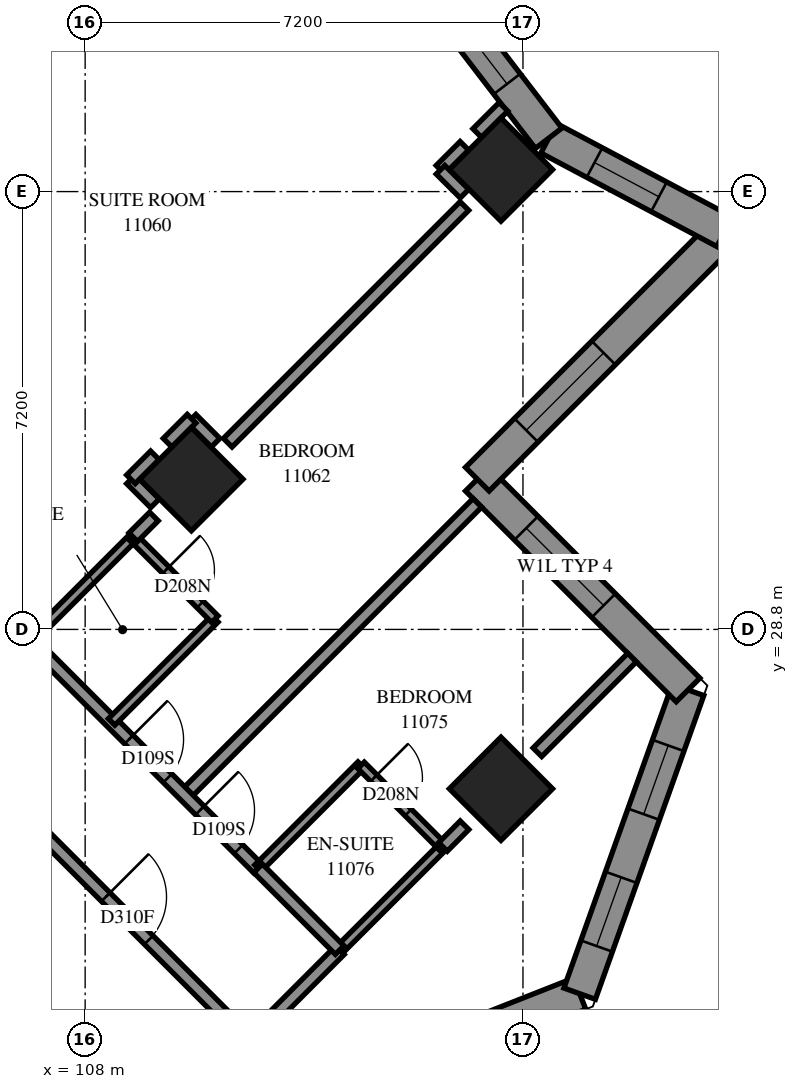
"""IFC4 building model, lengths in metres.
Left out: names, types, materials, properties, quantities, classifications, styles, units other than length and angle.
Written with IfcOpenShell. Run it as: python <this file> out.ifc"""

import sys

from ifc_helpers import new_model, si_unit, direction, frame, frame_2d, origin, origin_2d, place, context, subcontext, project, spatial, polyline, rectangle, outline, extrude, element, fill, save


model = new_model("IFC4")
c1 = context("Model", 3, precision=1e-05, world=origin(), true_north=direction((0.0, 1.0)))
c2 = subcontext(c1, "Body", "Model", "MODEL_VIEW")
j1 = project(units=[si_unit("LENGTHUNIT", "METRE"), si_unit("PLANEANGLEUNIT", "RADIAN")], contexts=[c1])
p1 = place(None, origin())
s1 = spatial("IfcSite", under=j1, at=p1, CompositionType="ELEMENT")
p2 = place(p1, origin())
s2 = spatial("IfcBuilding", under=s1, at=p2, CompositionType="ELEMENT")
p3 = place(p2, frame((0.0, 0.0, 44.0)))
s3 = spatial("IfcBuildingStorey", under=s2, at=p3, CompositionType="ELEMENT", Elevation=44.0)
for number, where, z_axis, x_axis in (
    (1, (114.838, 36.362, 0.0), (0.0, 0.0, 1.0), (0.707, -0.707, 0.0)),
    (2, (109.747, 31.271, 0.0), (0.0, 0.0, 1.0), (0.707, -0.707, 0.0)),
    (3, (114.838, 26.18, 0.0), (0.0, 0.0, 1.0), (0.707, -0.707, 0.0)),
):
    element("IfcColumn", number, at=place(p3, frame(where, z_axis=z_axis, x_axis=x_axis)), inside=s3, PredefinedType="COLUMN", context=c2, shape_type="SweptSolid", body=[
        extrude(rectangle(XDim=1.2, YDim=1.2, at=origin_2d()), origin(), (0.0, 0.0, 1.0), 3.1),
    ])
p4 = place(p3, frame((111.002, 20.787, 0.0), z_axis=(0.0, 0.0, 1.0), x_axis=(0.930334543, 0.3667119279, 0.0)))
e4 = element("IfcWall", 4, at=p4, inside=s3, PredefinedType="SOLIDWALL", context=c2, shape_type="SweptSolid", body=[
    extrude(outline(polyline([(0.119, -0.275), (5.64, -0.275), (5.39, 0.275), (-0.119, 0.275), (0.119, -0.275)])), origin(), (0.0, 0.0, 1.0), 3.1),
])
p5 = place(p4, frame((1.178, 0.0, 0.5)))
e5 = element("IfcOpeningElement", 5, at=p5, cuts=e4, PredefinedType="OPENING", context=c2, shape_type="SweptSolid", body=[
    extrude(rectangle(XDim=2.8, YDim=2.45, at=frame_2d((1.4, 1.225))), frame((0.0, 0.285, 0.0), z_axis=(0.0, -1.0, 0.0), x_axis=(1.0, 0.0, 0.0)), (0.0, 0.0, 1.0), 0.57),
])
p6 = place(p3, frame((116.132, 22.81, 0.0), z_axis=(0.0, 0.0, 1.0), x_axis=(0.3360509292, 0.9418438156, 0.0)))
e6 = element("IfcWall", 6, at=p6, inside=s3, PredefinedType="SOLIDWALL", context=c2, shape_type="SweptSolid", body=[
    extrude(outline(polyline([(-0.125, -0.275), (5.478, -0.275), (5.13, 0.275), (0.125, 0.275), (-0.125, -0.275)])), origin(), (0.0, 0.0, 1.0), 3.1),
])
p7 = place(p6, frame((0.832, 0.0, 0.5)))
e7 = element("IfcOpeningElement", 7, at=p7, cuts=e6, PredefinedType="OPENING", context=c2, shape_type="SweptSolid", body=[
    extrude(rectangle(XDim=1.2, YDim=2.45, at=frame_2d((0.6, 1.225))), frame((0.0, 0.285, 0.0), z_axis=(0.0, -1.0, 0.0), x_axis=(1.0, 0.0, 0.0)), (0.0, 0.0, 1.0), 0.57),
])
p8 = place(p6, frame((3.134, 0.0, 0.5)))
e8 = element("IfcOpeningElement", 8, at=p8, cuts=e6, PredefinedType="OPENING", context=c2, shape_type="SweptSolid", body=[
    extrude(rectangle(XDim=1.2, YDim=2.45, at=frame_2d((0.6, 1.225))), frame((0.0, 0.285, 0.0), z_axis=(0.0, -1.0, 0.0), x_axis=(1.0, 0.0, 0.0)), (0.0, 0.0, 1.0), 0.57),
])
p9 = place(p3, frame((117.915, 27.805, 0.0), z_axis=(0.0, 0.0, 1.0), x_axis=(-0.7071067812, 0.7071067812, 0.0)))
e9 = element("IfcWall", 9, at=p9, inside=s3, PredefinedType="SOLIDWALL", context=c2, shape_type="SweptSolid", body=[
    extrude(outline(polyline([(-0.174, -0.275), (4.626, -0.275), (5.176, 0.275), (0.174, 0.275), (-0.174, -0.275)])), origin(), (0.0, 0.0, 1.0), 3.1),
])
p10 = place(p9, frame((1.964, 0.0, 0.6)))
e10 = element("IfcOpeningElement", 10, at=p10, cuts=e9, PredefinedType="OPENING", context=c2, shape_type="SweptSolid", body=[
    extrude(rectangle(XDim=1.8, YDim=1.9, at=frame_2d((0.9, 0.95))), frame((0.0, 0.285, 0.0), z_axis=(0.0, -1.0, 0.0), x_axis=(1.0, 0.0, 0.0)), (0.0, 0.0, 1.0), 0.57),
])
p11 = place(p3, frame((114.449, 31.271, 0.0), z_axis=(0.0, 0.0, 1.0), x_axis=(0.7070980919, 0.7071154704, 0.0)))
e11 = element("IfcWall", 11, at=p11, inside=s3, PredefinedType="SOLIDWALL", context=c2, shape_type="SweptSolid", body=[
    extrude(outline(polyline([(0.275, -0.275), (6.126, -0.275), (5.383, 0.275), (-0.275, 0.275), (0.275, -0.275)])), origin(), (0.0, 0.0, 1.0), 3.1),
])
p12 = place(p11, frame((1.137, 0.0, 0.6)))
e12 = element("IfcOpeningElement", 12, at=p12, cuts=e11, PredefinedType="OPENING", context=c2, shape_type="SweptSolid", body=[
    extrude(rectangle(XDim=1.8, YDim=1.9, at=frame_2d((0.9, 0.95))), frame((0.0, 0.285, 0.0), z_axis=(0.0, -1.0, 0.0), x_axis=(1.0, 0.0, 0.0)), (0.0, 0.0, 1.0), 0.57),
])
p13 = place(p3, frame((118.518, 35.34, 0.0), z_axis=(0.0, 0.0, 1.0), x_axis=(-0.8831066362, 0.4691723234, 0.0)))
e13 = element("IfcWall", 13, at=p13, inside=s3, PredefinedType="SOLIDWALL", context=c2, shape_type="SweptSolid", body=[
    extrude(outline(polyline([(-0.372, -0.275), (3.219, -0.275), (3.338, 0.275), (0.372, 0.275), (-0.372, -0.275)])), origin(), (0.0, 0.0, 1.0), 3.1),
])
p14 = place(p13, frame((1.225, 0.0, 0.5)))
e14 = element("IfcOpeningElement", 14, at=p14, cuts=e13, PredefinedType="OPENING", context=c2, shape_type="SweptSolid", body=[
    extrude(rectangle(XDim=1.2, YDim=2.45, at=frame_2d((0.6, 1.225))), frame((0.0, 0.285, 0.0), z_axis=(0.0, -1.0, 0.0), x_axis=(1.0, 0.0, 0.0)), (0.0, 0.0, 1.0), 0.57),
])
p15 = place(p3, frame((115.623, 36.878, 0.0), z_axis=(0.0, 0.0, 1.0), x_axis=(-0.6089799783, 0.7931855937, 0.0)))
e15 = element("IfcWall", 15, at=p15, inside=s3, PredefinedType="SOLIDWALL", context=c2, shape_type="SweptSolid", body=[
    extrude(outline(polyline([(0.06, -0.275), (3.522, -0.275), (3.45, 0.275), (-0.06, 0.275), (0.06, -0.275)])), origin(), (0.0, 0.0, 1.0), 3.1),
])
p16 = place(p15, frame((1.125, 0.0, 0.5)))
e16 = element("IfcOpeningElement", 16, at=p16, cuts=e15, PredefinedType="OPENING", context=c2, shape_type="SweptSolid", body=[
    extrude(rectangle(XDim=1.2, YDim=2.45, at=frame_2d((0.6, 1.225))), frame((0.0, 0.285, 0.0), z_axis=(0.0, -1.0, 0.0), x_axis=(1.0, 0.0, 0.0)), (0.0, 0.0, 1.0), 0.57),
])
p17 = place(p3, frame((99.459, 36.255, 0.0), z_axis=(0.0, 0.0, 1.0), x_axis=(0.7071903932, 0.7070231593, 0.0)))
e17 = element("IfcWall", 17, at=p17, inside=s3, PredefinedType="PARTITIONING", context=c2, shape_type="SweptSolid", body=[
    extrude(rectangle(XDim=11.959, YDim=0.2, at=frame_2d((5.98, 0.0))), origin(), (0.0, 0.0, 1.0), 3.1),
])
p18 = place(p3, frame((103.061, 29.677, 0.0), z_axis=(0.0, 0.0, 1.0), x_axis=(0.7071067812, -0.7071067812, 0.0)))
e18 = element("IfcWall", 18, at=p18, inside=s3, PredefinedType="PARTITIONING", context=c2, shape_type="SweptSolid", body=[
    extrude(rectangle(XDim=10.802, YDim=0.2, at=frame_2d((5.401, 0.0))), origin(), (0.0, 0.0, 1.0), 3.1),
])
p19 = place(p18, frame((2.012, 0.0, 0.0)))
e19 = element("IfcOpeningElement", 19, at=p19, cuts=e18, PredefinedType="OPENING", context=c2, shape_type="SweptSolid", body=[
    extrude(rectangle(XDim=0.9, YDim=2.1, at=frame_2d((0.45, 1.05))), frame((0.0, 0.11, 0.0), z_axis=(0.0, -1.0, 0.0), x_axis=(1.0, 0.0, 0.0)), (0.0, 0.0, 1.0), 0.22),
])
p20 = place(p18, frame((7.463, 0.0, 0.0)))
e20 = element("IfcOpeningElement", 20, at=p20, cuts=e18, PredefinedType="OPENING", context=c2, shape_type="SweptSolid", body=[
    extrude(rectangle(XDim=1.0, YDim=2.1, at=frame_2d((0.5, 1.05))), frame((0.0, 0.11, 0.0), z_axis=(0.0, -1.0, 0.0), x_axis=(1.0, 0.0, 0.0)), (0.0, 0.0, 1.0), 0.22),
])
p21 = place(p3, frame((109.64, 26.074, 0.0), z_axis=(0.0, 0.0, 1.0), x_axis=(0.7072538194, 0.7069597124, 0.0)))
e21 = element("IfcWall", 21, at=p21, inside=s3, PredefinedType="PARTITIONING", context=c2, shape_type="SweptSolid", body=[
    extrude(rectangle(XDim=6.8, YDim=0.2, at=frame_2d((3.4, 0.0))), origin(), (0.0, 0.0, 1.0), 3.1),
])
for number, where, z_axis, x_axis in (
    (22, (110.345, 31.871, 0.0), (0.0, 0.0, 1.0), (0.707, 0.707, 0.0)),
    (23, (105.255, 36.963, 0.0), (0.0, 0.0, 1.0), (0.707, 0.707, 0.0)),
):
    element("IfcWall", number, at=place(p3, frame(where, z_axis=z_axis, x_axis=x_axis)), inside=s3, PredefinedType="PARTITIONING", context=c2, shape_type="SweptSolid", body=[
        extrude(rectangle(XDim=5.504, YDim=0.2, at=frame_2d((2.752, 0.0))), origin(), (0.0, 0.0, 1.0), 3.1),
    ])
p22 = place(p3, frame((107.093, 28.615, 0.0), z_axis=(0.0, 0.0, 1.0), x_axis=(0.7072011313, -0.7070124185, 0.0)))
e24 = element("IfcWall", 24, at=p22, inside=s3, PredefinedType="PARTITIONING", context=c2, shape_type="SweptSolid", body=[
    extrude(rectangle(XDim=5.299, YDim=0.2, at=frame_2d((2.65, 0.0))), origin(), (0.0, 0.0, 1.0), 3.1),
])
p23 = place(p22, frame((2.299, 0.0, 0.0)))
e25 = element("IfcOpeningElement", 25, at=p23, cuts=e24, PredefinedType="OPENING", context=c2, shape_type="SweptSolid", body=[
    extrude(rectangle(XDim=0.9, YDim=2.1, at=frame_2d((0.45, 1.05))), frame((0.0, 0.11, 0.0), z_axis=(0.0, -1.0, 0.0), x_axis=(1.0, 0.0, 0.0)), (0.0, 0.0, 1.0), 0.22),
])
p24 = place(p22, frame((3.949, 0.0, 0.0)))
e26 = element("IfcOpeningElement", 26, at=p24, cuts=e24, PredefinedType="OPENING", context=c2, shape_type="SweptSolid", body=[
    extrude(rectangle(XDim=0.9, YDim=2.1, at=frame_2d((0.45, 1.05))), frame((0.0, 0.11, 0.0), z_axis=(0.0, -1.0, 0.0), x_axis=(1.0, 0.0, 0.0)), (0.0, 0.0, 1.0), 0.22),
])
p25 = place(p3, frame((108.435, 27.279, 0.0), z_axis=(0.0, 0.0, 1.0), x_axis=(0.7075233388, 0.706689978, 0.0)))
e27 = element("IfcWall", 27, at=p25, inside=s3, PredefinedType="PARTITIONING", context=c2, shape_type="SweptSolid", body=[
    extrude(rectangle(XDim=2.4, YDim=0.15, at=frame_2d((1.2, 0.0))), origin(), (0.0, 0.0, 1.0), 3.1),
])
p26 = place(p3, frame((112.183, 23.531, 0.0), z_axis=(0.0, 0.0, 1.0), x_axis=(0.7075233388, 0.706689978, 0.0)))
e28 = element("IfcWall", 28, at=p26, inside=s3, PredefinedType="PARTITIONING", context=c2, shape_type="SweptSolid", body=[
    extrude(rectangle(XDim=2.4, YDim=0.15, at=frame_2d((1.2, 0.0))), origin(), (0.0, 0.0, 1.0), 2.6),
])
for number, where, z_axis, x_axis in (
    (29, (107.095, 28.621, 0.0), (0.0, 0.0, 1.0), (0.707, 0.707, 0.0)),
    (30, (110.843, 24.873, 0.0), (0.0, 0.0, 1.0), (0.707, 0.707, 0.0)),
):
    element("IfcWall", number, at=place(p3, frame(where, z_axis=z_axis, x_axis=x_axis)), inside=s3, PredefinedType="PARTITIONING", context=c2, shape_type="SweptSolid", body=[
        extrude(rectangle(XDim=2.398, YDim=0.15, at=frame_2d((1.199, 0.0))), origin(), (0.0, 0.0, 1.0), 3.1),
    ])
p27 = place(p3, frame((115.438, 26.78, 0.0), z_axis=(0.0, 0.0, 1.0), x_axis=(0.7071067812, 0.7071067812, 0.0)))
e31 = element("IfcWall", 31, at=p27, inside=s3, PredefinedType="PARTITIONING", context=c2, shape_type="SweptSolid", body=[
    extrude(rectangle(XDim=2.201, YDim=0.2, at=frame_2d((1.101, 0.0))), origin(), (0.0, 0.0, 1.0), 3.1),
])
p28 = place(p3, frame((110.705, 22.039, 0.0), z_axis=(0.0, 0.0, 1.0), x_axis=(0.7066304548, 0.7075827869, 0.0)))
e32 = element("IfcWall", 32, at=p28, inside=s3, PredefinedType="PARTITIONING", context=c2, shape_type="SweptSolid", body=[
    extrude(rectangle(XDim=2.1, YDim=0.2, at=frame_2d((1.05, 0.0))), origin(), (0.0, 0.0, 1.0), 2.6),
])
p29 = place(p3, frame((108.789, 30.313, 0.0), z_axis=(0.0, 0.0, 1.0), x_axis=(0.7071067812, -0.7071067812, 0.0)))
e33 = element("IfcWall", 33, at=p29, inside=s3, PredefinedType="PARTITIONING", context=c2, shape_type="SweptSolid", body=[
    extrude(rectangle(XDim=1.901, YDim=0.15, at=frame_2d((0.95, 0.0))), origin(), (0.0, 0.0, 1.0), 3.1),
])
p30 = place(p29, frame((0.76, 0.0, 0.0)))
e34 = element("IfcOpeningElement", 34, at=p30, cuts=e33, PredefinedType="OPENING", context=c2, shape_type="SweptSolid", body=[
    extrude(rectangle(XDim=0.8, YDim=2.1, at=frame_2d((0.4, 1.05))), frame((0.0, 0.085, 0.0), z_axis=(0.0, -1.0, 0.0), x_axis=(1.0, 0.0, 0.0)), (0.0, 0.0, 1.0), 0.17),
])
p31 = place(p3, frame((112.537, 26.565, 0.0), z_axis=(0.0, 0.0, 1.0), x_axis=(0.7071067812, -0.7071067812, 0.0)))
e35 = element("IfcWall", 35, at=p31, inside=s3, PredefinedType="PARTITIONING", context=c2, shape_type="SweptSolid", body=[
    extrude(rectangle(XDim=1.901, YDim=0.15, at=frame_2d((0.95, 0.0))), origin(), (0.0, 0.0, 1.0), 3.1),
])
p32 = place(p31, frame((0.297, 0.0, 0.0)))
e36 = element("IfcOpeningElement", 36, at=p32, cuts=e35, PredefinedType="OPENING", context=c2, shape_type="SweptSolid", body=[
    extrude(rectangle(XDim=0.8, YDim=2.1, at=frame_2d((0.4, 1.05))), frame((0.0, 0.085, 0.0), z_axis=(0.0, -1.0, 0.0), x_axis=(1.0, 0.0, 0.0)), (0.0, 0.0, 1.0), 0.17),
])
p33 = place(p3, frame((110.843, 24.871, 0.0), z_axis=(0.0, 0.0, 1.0), x_axis=(0.7065800724, -0.7076330979, 0.0)))
e37 = element("IfcWall", 37, at=p33, inside=s3, PredefinedType="PARTITIONING", context=c2, shape_type="SweptSolid", body=[
    extrude(rectangle(XDim=1.899, YDim=0.2, at=frame_2d((0.95, 0.0))), origin(), (0.0, 0.0, 1.0), 3.1),
])
p34 = place(p3, frame((114.447, 36.963, 0.0), z_axis=(0.0, 0.0, 1.0), x_axis=(0.7071067812, 0.7071067812, 0.0)))
e38 = element("IfcWall", 38, at=p34, inside=s3, PredefinedType="PARTITIONING", context=c2, shape_type="SweptSolid", body=[
    extrude(rectangle(XDim=0.611, YDim=0.2, at=frame_2d((0.305, 0.0))), origin(), (0.0, 0.0, 1.0), 3.1),
])
for number, where, z_axis, x_axis in (
    (39, (113.843, 36.359, 0.0), (0.0, 0.0, 1.0), (0.707, 0.707, 0.0)),
    (40, (108.754, 31.268, 0.0), (0.0, 0.0, 1.0), (0.707, -0.707, 0.0)),
    (41, (109.751, 32.265, 0.0), (0.0, 0.0, 1.0), (0.707, -0.707, 0.0)),
    (42, (109.355, 31.871, 0.0), (0.0, 0.0, 1.0), (0.707, 0.707, 0.0)),
    (43, (108.753, 31.269, 0.0), (0.0, 0.0, 1.0), (0.707, 0.707, 0.0)),
):
    element("IfcWall", number, at=place(p3, frame(where, z_axis=z_axis, x_axis=x_axis)), inside=s3, PredefinedType="PARTITIONING", context=c2, shape_type="SweptSolid", body=[
        extrude(rectangle(XDim=0.557, YDim=0.2, at=frame_2d((0.279, 0.0))), origin(), (0.0, 0.0, 1.0), 3.1),
    ])
p35 = place(p3, frame((113.845, 36.359, 0.0), z_axis=(0.0, 0.0, 1.0), x_axis=(0.7089037401, -0.705305244, 0.0)))
e44 = element("IfcWall", 44, at=p35, inside=s3, PredefinedType="PARTITIONING", context=c2, shape_type="SweptSolid", body=[
    extrude(rectangle(XDim=0.556, YDim=0.2, at=frame_2d((0.278, 0.0))), origin(), (0.0, 0.0, 1.0), 3.1),
])
p36 = place(p3, frame((113.885, 25.223, 0.0), z_axis=(0.0, 0.0, 1.0), x_axis=(0.7051121336, 0.709095818, 0.0)))
e45 = element("IfcWall", 45, at=p36, inside=s3, PredefinedType="PARTITIONING", context=c2, shape_type="SweptSolid", body=[
    extrude(rectangle(XDim=0.502, YDim=0.2, at=frame_2d((0.251, 0.0))), origin(), (0.0, 0.0, 1.0), 2.6),
])
p37 = place(p3, frame((108.791, 30.317, 0.0), z_axis=(0.0, 0.0, 1.0), x_axis=(0.7071067812, 0.7071067812, 0.0)))
e46 = element("IfcWall", 46, at=p37, inside=s3, PredefinedType="PARTITIONING", context=c2, shape_type="SweptSolid", body=[
    extrude(rectangle(XDim=0.481, YDim=0.2, at=frame_2d((0.24, 0.0))), origin(), (0.0, 0.0, 1.0), 3.1),
])
p38 = place(p7, origin())
e47 = element("IfcWindow", 47, at=p38, inside=s3, PartitioningType="SINGLE_PANEL", PredefinedType="WINDOW", context=c2, shape_type="SweptSolid", body=[
    extrude(rectangle(XDim=1.2, YDim=2.45, at=frame_2d((0.6, 1.225))), frame((0.0, 0.155, 0.0), z_axis=(0.0, -1.0, 0.0), x_axis=(1.0, 0.0, 0.0)), (0.0, 0.0, 1.0), 0.06),
])
fill(e7, e47)
p39 = place(p8, origin())
e48 = element("IfcWindow", 48, at=p39, inside=s3, PartitioningType="SINGLE_PANEL", PredefinedType="WINDOW", context=c2, shape_type="SweptSolid", body=[
    extrude(rectangle(XDim=1.2, YDim=2.45, at=frame_2d((0.6, 1.225))), frame((0.0, 0.155, 0.0), z_axis=(0.0, -1.0, 0.0), x_axis=(1.0, 0.0, 0.0)), (0.0, 0.0, 1.0), 0.06),
])
fill(e8, e48)
p40 = place(p10, origin())
e49 = element("IfcWindow", 49, at=p40, inside=s3, PartitioningType="SINGLE_PANEL", PredefinedType="WINDOW", context=c2, shape_type="SweptSolid", body=[
    extrude(rectangle(XDim=1.8, YDim=1.9, at=frame_2d((0.9, 0.95))), frame((0.0, 0.155, 0.0), z_axis=(0.0, -1.0, 0.0), x_axis=(1.0, 0.0, 0.0)), (0.0, 0.0, 1.0), 0.06),
])
fill(e10, e49)
p41 = place(p12, origin())
e50 = element("IfcWindow", 50, at=p41, inside=s3, PartitioningType="SINGLE_PANEL", PredefinedType="WINDOW", context=c2, shape_type="SweptSolid", body=[
    extrude(rectangle(XDim=1.8, YDim=1.9, at=frame_2d((0.9, 0.95))), frame((0.0, 0.155, 0.0), z_axis=(0.0, -1.0, 0.0), x_axis=(1.0, 0.0, 0.0)), (0.0, 0.0, 1.0), 0.06),
])
fill(e12, e50)
p42 = place(p14, origin())
e51 = element("IfcWindow", 51, at=p42, inside=s3, PartitioningType="SINGLE_PANEL", PredefinedType="WINDOW", context=c2, shape_type="SweptSolid", body=[
    extrude(rectangle(XDim=1.2, YDim=2.45, at=frame_2d((0.6, 1.225))), frame((0.0, 0.155, 0.0), z_axis=(0.0, -1.0, 0.0), x_axis=(1.0, 0.0, 0.0)), (0.0, 0.0, 1.0), 0.06),
])
fill(e14, e51)
p43 = place(p16, origin())
e52 = element("IfcWindow", 52, at=p43, inside=s3, PartitioningType="SINGLE_PANEL", PredefinedType="WINDOW", context=c2, shape_type="SweptSolid", body=[
    extrude(rectangle(XDim=1.2, YDim=2.45, at=frame_2d((0.6, 1.225))), frame((0.0, 0.155, 0.0), z_axis=(0.0, -1.0, 0.0), x_axis=(1.0, 0.0, 0.0)), (0.0, 0.0, 1.0), 0.06),
])
fill(e16, e52)
p44 = place(p23, origin())
e53 = element("IfcDoor", 53, at=p44, inside=s3, OperationType="SINGLE_SWING_LEFT", PredefinedType="DOOR", context=c2, shape_type="SweptSolid", body=[
    extrude(rectangle(XDim=0.9, YDim=2.1, at=frame_2d((0.45, 1.05))), frame((0.0, 0.025, 0.0), z_axis=(0.0, -1.0, 0.0), x_axis=(1.0, 0.0, 0.0)), (0.0, 0.0, 1.0), 0.05),
])
fill(e25, e53)
p45 = place(p30, origin())
e54 = element("IfcDoor", 54, at=p45, inside=s3, OperationType="SINGLE_SWING_RIGHT", PredefinedType="DOOR", context=c2, shape_type="SweptSolid", body=[
    extrude(rectangle(XDim=0.8, YDim=2.1, at=frame_2d((0.4, 1.05))), frame((0.0, 0.025, 0.0), z_axis=(0.0, -1.0, 0.0), x_axis=(1.0, 0.0, 0.0)), (0.0, 0.0, 1.0), 0.05),
])
fill(e34, e54)
p46 = place(p20, origin())
e55 = element("IfcDoor", 55, at=p46, inside=s3, OperationType="SINGLE_SWING_RIGHT", PredefinedType="DOOR", context=c2, shape_type="SweptSolid", body=[
    extrude(rectangle(XDim=1.0, YDim=2.1, at=frame_2d((0.5, 1.05))), frame((0.0, 0.025, 0.0), z_axis=(0.0, -1.0, 0.0), x_axis=(1.0, 0.0, 0.0)), (0.0, 0.0, 1.0), 0.05),
])
fill(e20, e55)
p47 = place(p24, origin())
e56 = element("IfcDoor", 56, at=p47, inside=s3, OperationType="SINGLE_SWING_RIGHT", PredefinedType="DOOR", context=c2, shape_type="SweptSolid", body=[
    extrude(rectangle(XDim=0.9, YDim=2.1, at=frame_2d((0.45, 1.05))), frame((0.0, 0.025, 0.0), z_axis=(0.0, -1.0, 0.0), x_axis=(1.0, 0.0, 0.0)), (0.0, 0.0, 1.0), 0.05),
])
fill(e26, e56)
p48 = place(p32, origin())
e57 = element("IfcDoor", 57, at=p48, inside=s3, OperationType="SINGLE_SWING_RIGHT", PredefinedType="DOOR", context=c2, shape_type="SweptSolid", body=[
    extrude(rectangle(XDim=0.8, YDim=2.1, at=frame_2d((0.4, 1.05))), frame((0.0, 0.025, 0.0), z_axis=(0.0, -1.0, 0.0), x_axis=(1.0, 0.0, 0.0)), (0.0, 0.0, 1.0), 0.05),
])
fill(e36, e57)
save(model, sys.argv[1])
